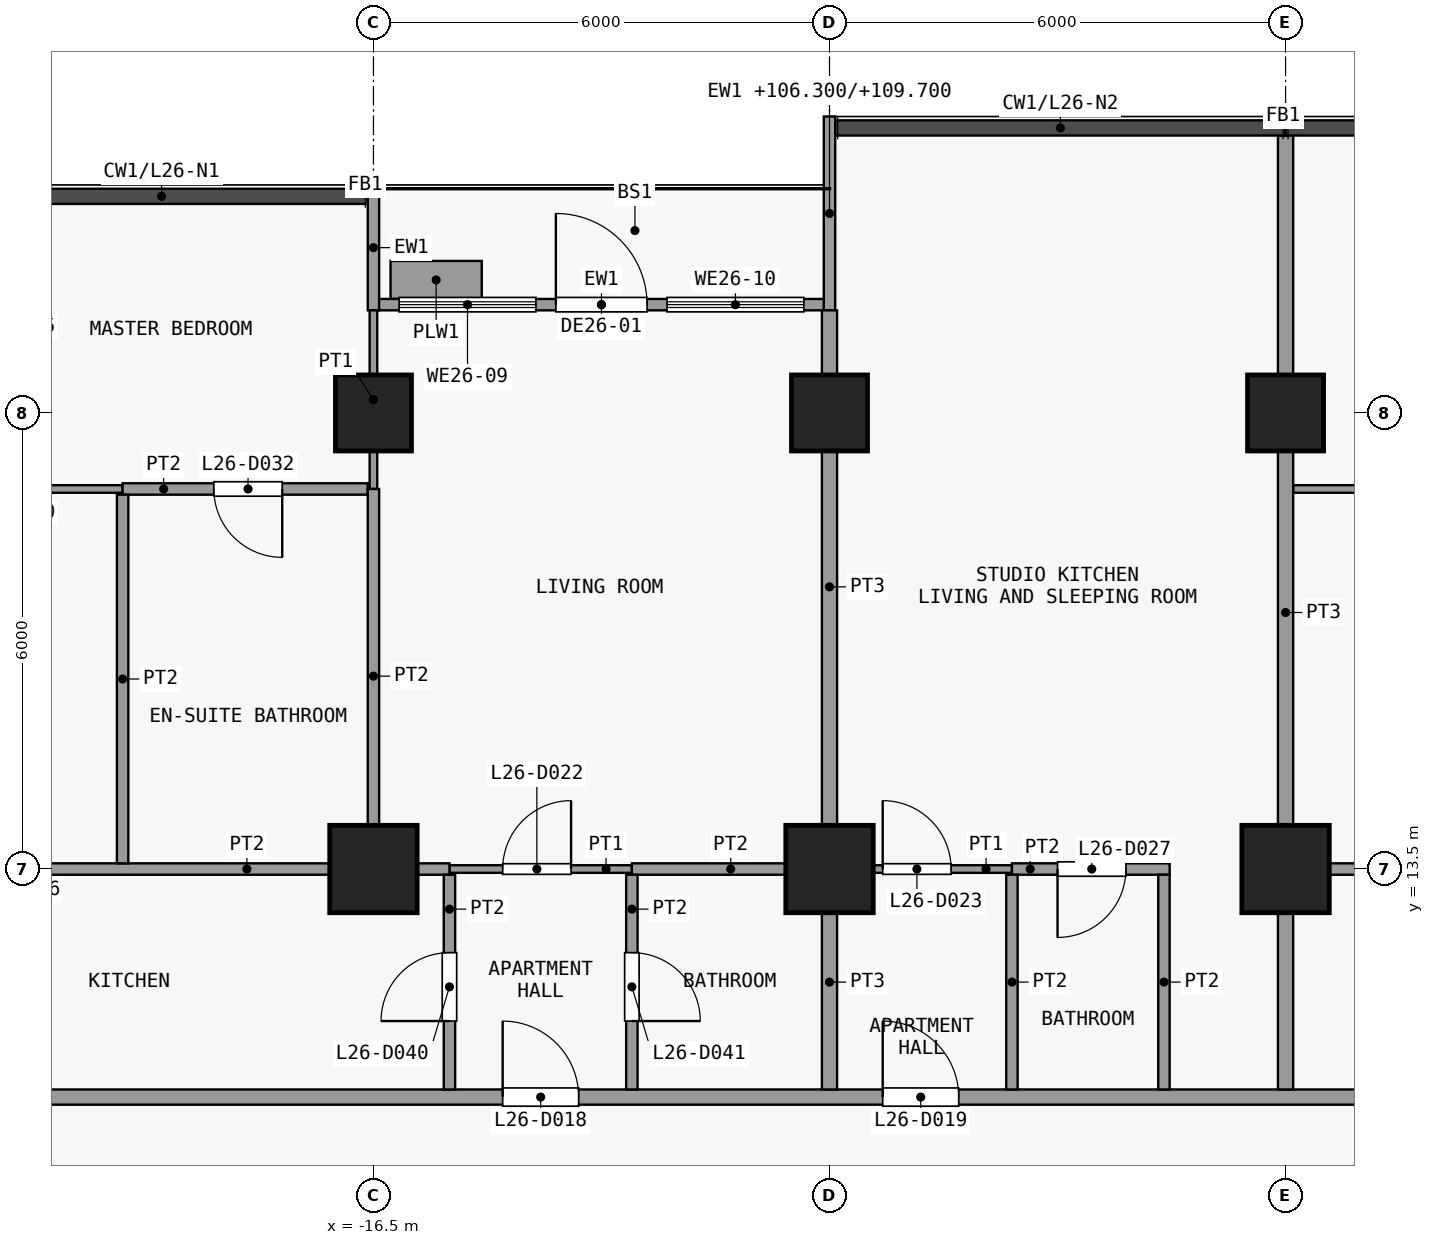
"""IFC4 building model, lengths in metres.
Left out: names, types, materials, properties, quantities, classifications, styles, units other than length and angle.
Written with IfcOpenShell. Run it as: python <this file> out.ifc"""

import sys

from ifc_helpers import new_model, si_unit, direction, frame, frame_2d, origin, origin_2d, place, context, subcontext, project, spatial, rectangle, extrude, element, fill, save


model = new_model("IFC4")
c1 = context("Model", 3, precision=1e-05, world=origin(), true_north=direction((0.0, 1.0)))
c2 = subcontext(c1, "Body", "Model", "MODEL_VIEW")
j1 = project(units=[si_unit("LENGTHUNIT", "METRE"), si_unit("PLANEANGLEUNIT", "RADIAN")], contexts=[c1])
p1 = place(None, origin())
s1 = spatial("IfcSite", under=j1, at=p1, CompositionType="ELEMENT")
p2 = place(p1, origin())
s2 = spatial("IfcBuilding", under=s1, at=p2, CompositionType="ELEMENT")
p3 = place(p2, frame((0.0, 0.0, 106.3)))
s3 = spatial("IfcBuildingStorey", under=s2, at=p3, CompositionType="ELEMENT", Elevation=106.3)
p4 = place(p3, frame((-16.5, 13.5, 0.0), z_axis=(0.0, 0.0, 1.0), x_axis=(1.0, 0.0, 0.0)))
e1 = element("IfcColumn", 1, at=p4, inside=s3, PredefinedType="COLUMN", context=c2, shape_type="SweptSolid", body=[
    extrude(rectangle(XDim=1.15, YDim=1.15, at=origin_2d()), origin(), (0.0, 0.0, 1.0), 3.6),
])
p5 = place(p3, frame((-16.5, 19.5, 0.0), z_axis=(0.0, 0.0, 1.0), x_axis=(1.0, 0.0, 0.0)))
e2 = element("IfcColumn", 2, at=p5, inside=s3, PredefinedType="COLUMN", context=c2, shape_type="SweptSolid", body=[
    extrude(rectangle(XDim=1.0, YDim=1.0, at=origin_2d()), origin(), (0.0, 0.0, 1.0), 3.6),
])
p6 = place(p3, frame((-10.5, 13.5, 0.0), z_axis=(0.0, 0.0, 1.0), x_axis=(1.0, 0.0, 0.0)))
e3 = element("IfcColumn", 3, at=p6, inside=s3, PredefinedType="COLUMN", context=c2, shape_type="SweptSolid", body=[
    extrude(rectangle(XDim=1.15, YDim=1.15, at=origin_2d()), origin(), (0.0, 0.0, 1.0), 3.6),
])
p7 = place(p3, frame((-10.5, 19.5, 0.0), z_axis=(0.0, 0.0, 1.0), x_axis=(1.0, 0.0, 0.0)))
e4 = element("IfcColumn", 4, at=p7, inside=s3, PredefinedType="COLUMN", context=c2, shape_type="SweptSolid", body=[
    extrude(rectangle(XDim=1.0, YDim=1.0, at=origin_2d()), origin(), (0.0, 0.0, 1.0), 3.6),
])
p8 = place(p3, frame((-4.5, 13.5, 0.0), z_axis=(0.0, 0.0, 1.0), x_axis=(1.0, 0.0, 0.0)))
e5 = element("IfcColumn", 5, at=p8, inside=s3, PredefinedType="COLUMN", context=c2, shape_type="SweptSolid", body=[
    extrude(rectangle(XDim=1.15, YDim=1.15, at=origin_2d()), origin(), (0.0, 0.0, 1.0), 3.6),
])
p9 = place(p3, frame((-4.5, 19.5, 0.0), z_axis=(0.0, 0.0, 1.0), x_axis=(1.0, 0.0, 0.0)))
e6 = element("IfcColumn", 6, at=p9, inside=s3, PredefinedType="COLUMN", context=c2, shape_type="SweptSolid", body=[
    extrude(rectangle(XDim=1.0, YDim=1.0, at=origin_2d()), origin(), (0.0, 0.0, 1.0), 3.6),
])
p10 = place(p3, frame((-16.5, 20.85, 0.0), z_axis=(0.0, 0.0, 1.0), x_axis=(0.0, 1.0, 0.0)))
e7 = element("IfcWall", 7, at=p10, inside=s3, PredefinedType="SOLIDWALL", context=c2, shape_type="SweptSolid", body=[
    extrude(rectangle(XDim=1.65, YDim=0.15, at=frame_2d((0.825, 0.0))), origin(), (0.0, 0.0, 1.0), 3.3),
])
p11 = place(p3, frame((-10.5, 20.85, 0.0), z_axis=(0.0, 0.0, 1.0), x_axis=(0.0, 1.0, 0.0)))
e8 = element("IfcWall", 8, at=p11, inside=s3, PredefinedType="SOLIDWALL", context=c2, shape_type="SweptSolid", body=[
    extrude(rectangle(XDim=2.55, YDim=0.15, at=frame_2d((1.275, 0.0))), origin(), (0.0, 0.0, 1.0), 3.4),
])
p12 = place(p3, frame((-16.425, 20.925, 0.0), z_axis=(0.0, 0.0, 1.0), x_axis=(1.0, 0.0, 0.0)))
e9 = element("IfcWall", 9, at=p12, inside=s3, PredefinedType="SOLIDWALL", context=c2, shape_type="SweptSolid", body=[
    extrude(rectangle(XDim=5.85, YDim=0.15, at=frame_2d((2.925, 0.0))), origin(), (0.0, 0.0, 1.0), 3.3),
])
p13 = place(p12, frame((2.325, 0.0, 0.0)))
e10 = element("IfcOpeningElement", 10, at=p13, cuts=e9, PredefinedType="OPENING", context=c2, shape_type="SweptSolid", body=[
    extrude(rectangle(XDim=1.2, YDim=2.4, at=frame_2d((0.6, 1.2))), frame((0.0, 0.085, 0.0), z_axis=(0.0, -1.0, 0.0), x_axis=(1.0, 0.0, 0.0)), (0.0, 0.0, 1.0), 0.17),
])
p14 = place(p12, frame((0.262, 0.0, 0.9)))
e11 = element("IfcOpeningElement", 11, at=p14, cuts=e9, PredefinedType="OPENING", context=c2, shape_type="SweptSolid", body=[
    extrude(rectangle(XDim=1.8, YDim=2.1, at=frame_2d((0.9, 1.05))), frame((0.0, 0.085, 0.0), z_axis=(0.0, -1.0, 0.0), x_axis=(1.0, 0.0, 0.0)), (0.0, 0.0, 1.0), 0.17),
])
p15 = place(p12, frame((3.788, 0.0, 0.9)))
e12 = element("IfcOpeningElement", 12, at=p15, cuts=e9, PredefinedType="OPENING", context=c2, shape_type="SweptSolid", body=[
    extrude(rectangle(XDim=1.8, YDim=2.1, at=frame_2d((0.9, 1.05))), frame((0.0, 0.085, 0.0), z_axis=(0.0, -1.0, 0.0), x_axis=(1.0, 0.0, 0.0)), (0.0, 0.0, 1.0), 0.17),
])
p16 = place(p3, frame((-16.275, 21.25, 0.0), z_axis=(0.0, 0.0, 1.0), x_axis=(1.0, 0.0, 0.0)))
e13 = element("IfcWall", 13, at=p16, inside=s3, PredefinedType="USERDEFINED", context=c2, shape_type="SweptSolid", body=[
    extrude(rectangle(XDim=1.2, YDim=0.5, at=frame_2d((0.6, 0.0))), origin(), (0.0, 0.0, 1.0), 0.9),
])
p17 = place(p3, frame((-23.85, 10.5, 0.0), z_axis=(0.0, 0.0, 1.0), x_axis=(1.0, 0.0, 0.0)))
e14 = element("IfcWall", 14, at=p17, inside=s3, PredefinedType="PARTITIONING", context=c2, shape_type="SweptSolid", body=[
    extrude(rectangle(XDim=50.1, YDim=0.2, at=frame_2d((25.05, 0.0))), origin(), (0.0, 0.0, 1.0), 3.3),
])
p18 = place(p17, frame((9.05, 0.0, 0.0)))
e15 = element("IfcOpeningElement", 15, at=p18, cuts=e14, PredefinedType="OPENING", context=c2, shape_type="SweptSolid", body=[
    extrude(rectangle(XDim=1.0, YDim=2.1, at=frame_2d((0.5, 1.05))), frame((0.0, 0.11, 0.0), z_axis=(0.0, -1.0, 0.0), x_axis=(1.0, 0.0, 0.0)), (0.0, 0.0, 1.0), 0.22),
])
p19 = place(p17, frame((14.05, 0.0, 0.0)))
e16 = element("IfcOpeningElement", 16, at=p19, cuts=e14, PredefinedType="OPENING", context=c2, shape_type="SweptSolid", body=[
    extrude(rectangle(XDim=1.0, YDim=2.1, at=frame_2d((0.5, 1.05))), frame((0.0, 0.11, 0.0), z_axis=(0.0, -1.0, 0.0), x_axis=(1.0, 0.0, 0.0)), (0.0, 0.0, 1.0), 0.22),
])
p20 = place(p17, frame((29.05, 0.0, 0.0)))
e17 = element("IfcOpeningElement", 17, at=p20, cuts=e14, PredefinedType="OPENING", context=c2, shape_type="SweptSolid", body=[
    extrude(rectangle(XDim=1.0, YDim=2.1, at=frame_2d((0.5, 1.05))), frame((0.0, 0.11, 0.0), z_axis=(0.0, -1.0, 0.0), x_axis=(1.0, 0.0, 0.0)), (0.0, 0.0, 1.0), 0.22),
])
p21 = place(p17, frame((41.05, 0.0, 0.0)))
e18 = element("IfcOpeningElement", 18, at=p21, cuts=e14, PredefinedType="OPENING", context=c2, shape_type="SweptSolid", body=[
    extrude(rectangle(XDim=1.0, YDim=2.1, at=frame_2d((0.5, 1.05))), frame((0.0, 0.11, 0.0), z_axis=(0.0, -1.0, 0.0), x_axis=(1.0, 0.0, 0.0)), (0.0, 0.0, 1.0), 0.22),
])
p22 = place(p3, frame((-15.5, 13.5, 0.0), z_axis=(0.0, 0.0, 1.0), x_axis=(1.0, 0.0, 0.0)))
e19 = element("IfcWall", 19, at=p22, inside=s3, PredefinedType="PARTITIONING", context=c2, shape_type="SweptSolid", body=[
    extrude(rectangle(XDim=2.4, YDim=0.1, at=frame_2d((1.2, 0.0))), origin(), (0.0, 0.0, 1.0), 3.3),
])
p23 = place(p22, frame((0.7, 0.0, 0.0)))
e20 = element("IfcOpeningElement", 20, at=p23, cuts=e19, PredefinedType="OPENING", context=c2, shape_type="SweptSolid", body=[
    extrude(rectangle(XDim=0.9, YDim=2.1, at=frame_2d((0.45, 1.05))), frame((0.0, 0.06, 0.0), z_axis=(0.0, -1.0, 0.0), x_axis=(1.0, 0.0, 0.0)), (0.0, 0.0, 1.0), 0.12),
])
p24 = place(p3, frame((-10.5, 13.5, 0.0), z_axis=(0.0, 0.0, 1.0), x_axis=(1.0, 0.0, 0.0)))
e21 = element("IfcWall", 21, at=p24, inside=s3, PredefinedType="PARTITIONING", context=c2, shape_type="SweptSolid", body=[
    extrude(rectangle(XDim=2.4, YDim=0.1, at=frame_2d((1.2, 0.0))), origin(), (0.0, 0.0, 1.0), 3.3),
])
p25 = place(p24, frame((0.7, 0.0, 0.0)))
e22 = element("IfcOpeningElement", 22, at=p25, cuts=e21, PredefinedType="OPENING", context=c2, shape_type="SweptSolid", body=[
    extrude(rectangle(XDim=0.9, YDim=2.1, at=frame_2d((0.45, 1.05))), frame((0.0, 0.06, 0.0), z_axis=(0.0, -1.0, 0.0), x_axis=(1.0, 0.0, 0.0)), (0.0, 0.0, 1.0), 0.12),
])
p26 = place(p3, frame((-23.85, 13.5, 0.0), z_axis=(0.0, 0.0, 1.0), x_axis=(1.0, 0.0, 0.0)))
e23 = element("IfcWall", 23, at=p26, inside=s3, PredefinedType="PARTITIONING", context=c2, shape_type="SweptSolid", body=[
    extrude(rectangle(XDim=8.35, YDim=0.15, at=frame_2d((4.175, 0.0))), origin(), (0.0, 0.0, 1.0), 3.3),
])
p27 = place(p26, frame((2.0, 0.0, 0.0)))
e24 = element("IfcOpeningElement", 24, at=p27, cuts=e23, PredefinedType="OPENING", context=c2, shape_type="SweptSolid", body=[
    extrude(rectangle(XDim=0.9, YDim=2.1, at=frame_2d((0.45, 1.05))), frame((0.0, 0.085, 0.0), z_axis=(0.0, -1.0, 0.0), x_axis=(1.0, 0.0, 0.0)), (0.0, 0.0, 1.0), 0.17),
])
p28 = place(p3, frame((-13.1, 13.5, 0.0), z_axis=(0.0, 0.0, 1.0), x_axis=(1.0, 0.0, 0.0)))
e25 = element("IfcWall", 25, at=p28, inside=s3, PredefinedType="PARTITIONING", context=c2, shape_type="SweptSolid", body=[
    extrude(rectangle(XDim=2.6, YDim=0.15, at=frame_2d((1.3, 0.0))), origin(), (0.0, 0.0, 1.0), 3.3),
])
p29 = place(p3, frame((-8.1, 13.5, 0.0), z_axis=(0.0, 0.0, 1.0), x_axis=(1.0, 0.0, 0.0)))
e26 = element("IfcWall", 26, at=p29, inside=s3, PredefinedType="PARTITIONING", context=c2, shape_type="SweptSolid", body=[
    extrude(rectangle(XDim=2.075, YDim=0.15, at=frame_2d((1.038, 0.0))), origin(), (0.0, 0.0, 1.0), 3.3),
])
p30 = place(p29, frame((0.6, 0.0, 0.0)))
e27 = element("IfcOpeningElement", 27, at=p30, cuts=e26, PredefinedType="OPENING", context=c2, shape_type="SweptSolid", body=[
    extrude(rectangle(XDim=0.9, YDim=2.1, at=frame_2d((0.45, 1.05))), frame((0.0, 0.085, 0.0), z_axis=(0.0, -1.0, 0.0), x_axis=(1.0, 0.0, 0.0)), (0.0, 0.0, 1.0), 0.17),
])
p31 = place(p3, frame((-4.4, 13.5, 0.0), z_axis=(0.0, 0.0, 1.0), x_axis=(1.0, 0.0, 0.0)))
e28 = element("IfcWall", 28, at=p31, inside=s3, PredefinedType="PARTITIONING", context=c2, shape_type="SweptSolid", body=[
    extrude(rectangle(XDim=8.9, YDim=0.15, at=frame_2d((4.45, 0.0))), origin(), (0.0, 0.0, 1.0), 3.3),
])
p32 = place(p3, frame((-25.25, 18.5, 0.0), z_axis=(0.0, 0.0, 1.0), x_axis=(1.0, 0.0, 0.0)))
e29 = element("IfcWall", 29, at=p32, inside=s3, PredefinedType="PARTITIONING", context=c2, shape_type="SweptSolid", body=[
    extrude(rectangle(XDim=5.45, YDim=0.1, at=frame_2d((2.725, 0.0))), origin(), (0.0, 0.0, 1.0), 3.3),
])
p33 = place(p32, frame((3.5, 0.0, 0.0)))
e30 = element("IfcOpeningElement", 30, at=p33, cuts=e29, PredefinedType="OPENING", context=c2, shape_type="SweptSolid", body=[
    extrude(rectangle(XDim=0.9, YDim=2.1, at=frame_2d((0.45, 1.05))), frame((0.0, 0.06, 0.0), z_axis=(0.0, -1.0, 0.0), x_axis=(1.0, 0.0, 0.0)), (0.0, 0.0, 1.0), 0.12),
])
p34 = place(p3, frame((-4.4, 18.5, 0.0), z_axis=(0.0, 0.0, 1.0), x_axis=(1.0, 0.0, 0.0)))
e31 = element("IfcWall", 31, at=p34, inside=s3, PredefinedType="PARTITIONING", context=c2, shape_type="SweptSolid", body=[
    extrude(rectangle(XDim=8.85, YDim=0.1, at=frame_2d((4.425, 0.0))), origin(), (0.0, 0.0, 1.0), 3.3),
])
p35 = place(p34, frame((4.0, 0.0, 0.0)))
e32 = element("IfcOpeningElement", 32, at=p35, cuts=e31, PredefinedType="OPENING", context=c2, shape_type="SweptSolid", body=[
    extrude(rectangle(XDim=0.9, YDim=2.1, at=frame_2d((0.45, 1.05))), frame((0.0, 0.06, 0.0), z_axis=(0.0, -1.0, 0.0), x_axis=(1.0, 0.0, 0.0)), (0.0, 0.0, 1.0), 0.12),
])
p36 = place(p3, frame((-19.8, 18.5, 0.0), z_axis=(0.0, 0.0, 1.0), x_axis=(1.0, 0.0, 0.0)))
e33 = element("IfcWall", 33, at=p36, inside=s3, PredefinedType="PARTITIONING", context=c2, shape_type="SweptSolid", body=[
    extrude(rectangle(XDim=3.225, YDim=0.15, at=frame_2d((1.613, 0.0))), origin(), (0.0, 0.0, 1.0), 3.3),
])
p37 = place(p36, frame((1.2, 0.0, 0.0)))
e34 = element("IfcOpeningElement", 34, at=p37, cuts=e33, PredefinedType="OPENING", context=c2, shape_type="SweptSolid", body=[
    extrude(rectangle(XDim=0.9, YDim=2.1, at=frame_2d((0.45, 1.05))), frame((0.0, 0.085, 0.0), z_axis=(0.0, -1.0, 0.0), x_axis=(1.0, 0.0, 0.0)), (0.0, 0.0, 1.0), 0.17),
])
p38 = place(p3, frame((-19.8, 13.575, 0.0), z_axis=(0.0, 0.0, 1.0), x_axis=(0.0, 1.0, 0.0)))
e35 = element("IfcWall", 35, at=p38, inside=s3, PredefinedType="PARTITIONING", context=c2, shape_type="SweptSolid", body=[
    extrude(rectangle(XDim=4.85, YDim=0.15, at=frame_2d((2.425, 0.0))), origin(), (0.0, 0.0, 1.0), 3.3),
])
p39 = place(p3, frame((-16.5, 18.5, 0.0), z_axis=(0.0, 0.0, 1.0), x_axis=(0.0, 1.0, 0.0)))
e36 = element("IfcWall", 36, at=p39, inside=s3, PredefinedType="PARTITIONING", context=c2, shape_type="SweptSolid", body=[
    extrude(rectangle(XDim=2.35, YDim=0.1, at=frame_2d((1.175, 0.0))), origin(), (0.0, 0.0, 1.0), 3.3),
])
p40 = place(p3, frame((-16.5, 13.575, 0.0), z_axis=(0.0, 0.0, 1.0), x_axis=(0.0, 1.0, 0.0)))
e37 = element("IfcWall", 37, at=p40, inside=s3, PredefinedType="PARTITIONING", context=c2, shape_type="SweptSolid", body=[
    extrude(rectangle(XDim=4.925, YDim=0.15, at=frame_2d((2.462, 0.0))), origin(), (0.0, 0.0, 1.0), 3.3),
])
p41 = place(p3, frame((-15.5, 10.6, 0.0), z_axis=(0.0, 0.0, 1.0), x_axis=(0.0, 1.0, 0.0)))
e38 = element("IfcWall", 38, at=p41, inside=s3, PredefinedType="PARTITIONING", context=c2, shape_type="SweptSolid", body=[
    extrude(rectangle(XDim=2.825, YDim=0.15, at=frame_2d((1.413, 0.0))), origin(), (0.0, 0.0, 1.0), 3.3),
])
p42 = place(p41, frame((0.9, 0.0, 0.0)))
e39 = element("IfcOpeningElement", 39, at=p42, cuts=e38, PredefinedType="OPENING", context=c2, shape_type="SweptSolid", body=[
    extrude(rectangle(XDim=0.9, YDim=2.1, at=frame_2d((0.45, 1.05))), frame((0.0, 0.085, 0.0), z_axis=(0.0, -1.0, 0.0), x_axis=(1.0, 0.0, 0.0)), (0.0, 0.0, 1.0), 0.17),
])
p43 = place(p3, frame((-13.1, 10.6, 0.0), z_axis=(0.0, 0.0, 1.0), x_axis=(0.0, 1.0, 0.0)))
e40 = element("IfcWall", 40, at=p43, inside=s3, PredefinedType="PARTITIONING", context=c2, shape_type="SweptSolid", body=[
    extrude(rectangle(XDim=2.825, YDim=0.15, at=frame_2d((1.413, 0.0))), origin(), (0.0, 0.0, 1.0), 3.3),
])
p44 = place(p43, frame((0.9, 0.0, 0.0)))
e41 = element("IfcOpeningElement", 41, at=p44, cuts=e40, PredefinedType="OPENING", context=c2, shape_type="SweptSolid", body=[
    extrude(rectangle(XDim=0.9, YDim=2.1, at=frame_2d((0.45, 1.05))), frame((0.0, 0.085, 0.0), z_axis=(0.0, -1.0, 0.0), x_axis=(1.0, 0.0, 0.0)), (0.0, 0.0, 1.0), 0.17),
])
p45 = place(p3, frame((-10.5, 10.6, 0.0), z_axis=(0.0, 0.0, 1.0), x_axis=(0.0, 1.0, 0.0)))
e42 = element("IfcWall", 42, at=p45, inside=s3, PredefinedType="PARTITIONING", context=c2, shape_type="SweptSolid", body=[
    extrude(rectangle(XDim=2.825, YDim=0.2, at=frame_2d((1.413, 0.0))), origin(), (0.0, 0.0, 1.0), 3.3),
])
p46 = place(p3, frame((-10.5, 13.575, 0.0), z_axis=(0.0, 0.0, 1.0), x_axis=(0.0, 1.0, 0.0)))
e43 = element("IfcWall", 43, at=p46, inside=s3, PredefinedType="PARTITIONING", context=c2, shape_type="SweptSolid", body=[
    extrude(rectangle(XDim=7.275, YDim=0.2, at=frame_2d((3.638, 0.0))), origin(), (0.0, 0.0, 1.0), 3.3),
])
for number, where, z_axis, x_axis in (
    (44, (-8.1, 10.6, 0.0), (0.0, 0.0, 1.0), (0.0, 1.0, 0.0)),
    (45, (-6.1, 10.6, 0.0), (0.0, 0.0, 1.0), (0.0, 1.0, 0.0)),
):
    element("IfcWall", number, at=place(p3, frame(where, z_axis=z_axis, x_axis=x_axis)), inside=s3, PredefinedType="PARTITIONING", context=c2, shape_type="SweptSolid", body=[
        extrude(rectangle(XDim=2.825, YDim=0.15, at=frame_2d((1.413, 0.0))), origin(), (0.0, 0.0, 1.0), 3.3),
    ])
p47 = place(p3, frame((-4.5, 10.6, 0.0), z_axis=(0.0, 0.0, 1.0), x_axis=(0.0, 1.0, 0.0)))
e46 = element("IfcWall", 46, at=p47, inside=s3, PredefinedType="PARTITIONING", context=c2, shape_type="SweptSolid", body=[
    extrude(rectangle(XDim=12.55, YDim=0.2, at=frame_2d((6.275, 0.0))), origin(), (0.0, 0.0, 1.0), 3.3),
])
p48 = place(p13, origin())
e47 = element("IfcDoor", 47, at=p48, inside=s3, OperationType="SINGLE_SWING_LEFT", PredefinedType="DOOR", context=c2, shape_type="SweptSolid", body=[
    extrude(rectangle(XDim=1.2, YDim=2.4, at=frame_2d((0.6, 1.2))), frame((0.0, 0.025, 0.0), z_axis=(0.0, -1.0, 0.0), x_axis=(1.0, 0.0, 0.0)), (0.0, 0.0, 1.0), 0.05),
])
fill(e10, e47)
p49 = place(p14, origin())
e48 = element("IfcWindow", 48, at=p49, inside=s3, PartitioningType="SINGLE_PANEL", PredefinedType="WINDOW", context=c2, shape_type="SweptSolid", body=[
    extrude(rectangle(XDim=1.8, YDim=2.1, at=frame_2d((0.9, 1.05))), frame((0.0, 0.03, 0.0), z_axis=(0.0, -1.0, 0.0), x_axis=(1.0, 0.0, 0.0)), (0.0, 0.0, 1.0), 0.06),
])
fill(e11, e48)
p50 = place(p15, origin())
e49 = element("IfcWindow", 49, at=p50, inside=s3, PartitioningType="SINGLE_PANEL", PredefinedType="WINDOW", context=c2, shape_type="SweptSolid", body=[
    extrude(rectangle(XDim=1.8, YDim=2.1, at=frame_2d((0.9, 1.05))), frame((0.0, 0.03, 0.0), z_axis=(0.0, -1.0, 0.0), x_axis=(1.0, 0.0, 0.0)), (0.0, 0.0, 1.0), 0.06),
])
fill(e12, e49)
p51 = place(p18, origin())
e50 = element("IfcDoor", 50, at=p51, inside=s3, OperationType="SINGLE_SWING_RIGHT", PredefinedType="DOOR", context=c2, shape_type="SweptSolid", body=[
    extrude(rectangle(XDim=1.0, YDim=2.1, at=frame_2d((0.5, 1.05))), frame((0.0, 0.025, 0.0), z_axis=(0.0, -1.0, 0.0), x_axis=(1.0, 0.0, 0.0)), (0.0, 0.0, 1.0), 0.05),
])
fill(e15, e50)
p52 = place(p19, origin())
e51 = element("IfcDoor", 51, at=p52, inside=s3, OperationType="SINGLE_SWING_RIGHT", PredefinedType="DOOR", context=c2, shape_type="SweptSolid", body=[
    extrude(rectangle(XDim=1.0, YDim=2.1, at=frame_2d((0.5, 1.05))), frame((0.0, 0.025, 0.0), z_axis=(0.0, -1.0, 0.0), x_axis=(1.0, 0.0, 0.0)), (0.0, 0.0, 1.0), 0.05),
])
fill(e16, e51)
p53 = place(p23, origin())
e52 = element("IfcDoor", 52, at=p53, inside=s3, OperationType="SINGLE_SWING_LEFT", PredefinedType="DOOR", context=c2, shape_type="SweptSolid", body=[
    extrude(rectangle(XDim=0.9, YDim=2.1, at=frame_2d((0.45, 1.05))), frame((0.0, 0.025, 0.0), z_axis=(0.0, -1.0, 0.0), x_axis=(1.0, 0.0, 0.0)), (0.0, 0.0, 1.0), 0.05),
])
fill(e20, e52)
p54 = place(p25, origin())
e53 = element("IfcDoor", 53, at=p54, inside=s3, OperationType="SINGLE_SWING_RIGHT", PredefinedType="DOOR", context=c2, shape_type="SweptSolid", body=[
    extrude(rectangle(XDim=0.9, YDim=2.1, at=frame_2d((0.45, 1.05))), frame((0.0, 0.025, 0.0), z_axis=(0.0, -1.0, 0.0), x_axis=(1.0, 0.0, 0.0)), (0.0, 0.0, 1.0), 0.05),
])
fill(e22, e53)
p55 = place(p30, origin())
e54 = element("IfcDoor", 54, at=p55, inside=s3, OperationType="SINGLE_SWING_LEFT", PredefinedType="DOOR", context=c2, shape_type="SweptSolid", body=[
    extrude(rectangle(XDim=0.9, YDim=2.1, at=frame_2d((0.45, 1.05))), frame((0.0, 0.025, 0.0), z_axis=(0.0, -1.0, 0.0), x_axis=(1.0, 0.0, 0.0)), (0.0, 0.0, 1.0), 0.05),
])
fill(e27, e54)
p56 = place(p37, origin())
e55 = element("IfcDoor", 55, at=p56, inside=s3, OperationType="SINGLE_SWING_RIGHT", PredefinedType="DOOR", context=c2, shape_type="SweptSolid", body=[
    extrude(rectangle(XDim=0.9, YDim=2.1, at=frame_2d((0.45, 1.05))), frame((0.0, 0.025, 0.0), z_axis=(0.0, -1.0, 0.0), x_axis=(1.0, 0.0, 0.0)), (0.0, 0.0, 1.0), 0.05),
])
fill(e34, e55)
p57 = place(p42, origin())
e56 = element("IfcDoor", 56, at=p57, inside=s3, OperationType="SINGLE_SWING_RIGHT", PredefinedType="DOOR", context=c2, shape_type="SweptSolid", body=[
    extrude(rectangle(XDim=0.9, YDim=2.1, at=frame_2d((0.45, 1.05))), frame((0.0, 0.025, 0.0), z_axis=(0.0, -1.0, 0.0), x_axis=(1.0, 0.0, 0.0)), (0.0, 0.0, 1.0), 0.05),
])
fill(e39, e56)
p58 = place(p44, origin())
e57 = element("IfcDoor", 57, at=p58, inside=s3, OperationType="SINGLE_SWING_LEFT", PredefinedType="DOOR", context=c2, shape_type="SweptSolid", body=[
    extrude(rectangle(XDim=0.9, YDim=2.1, at=frame_2d((0.45, 1.05))), frame((0.0, 0.025, 0.0), z_axis=(0.0, -1.0, 0.0), x_axis=(1.0, 0.0, 0.0)), (0.0, 0.0, 1.0), 0.05),
])
fill(e41, e57)
save(model, sys.argv[1])
